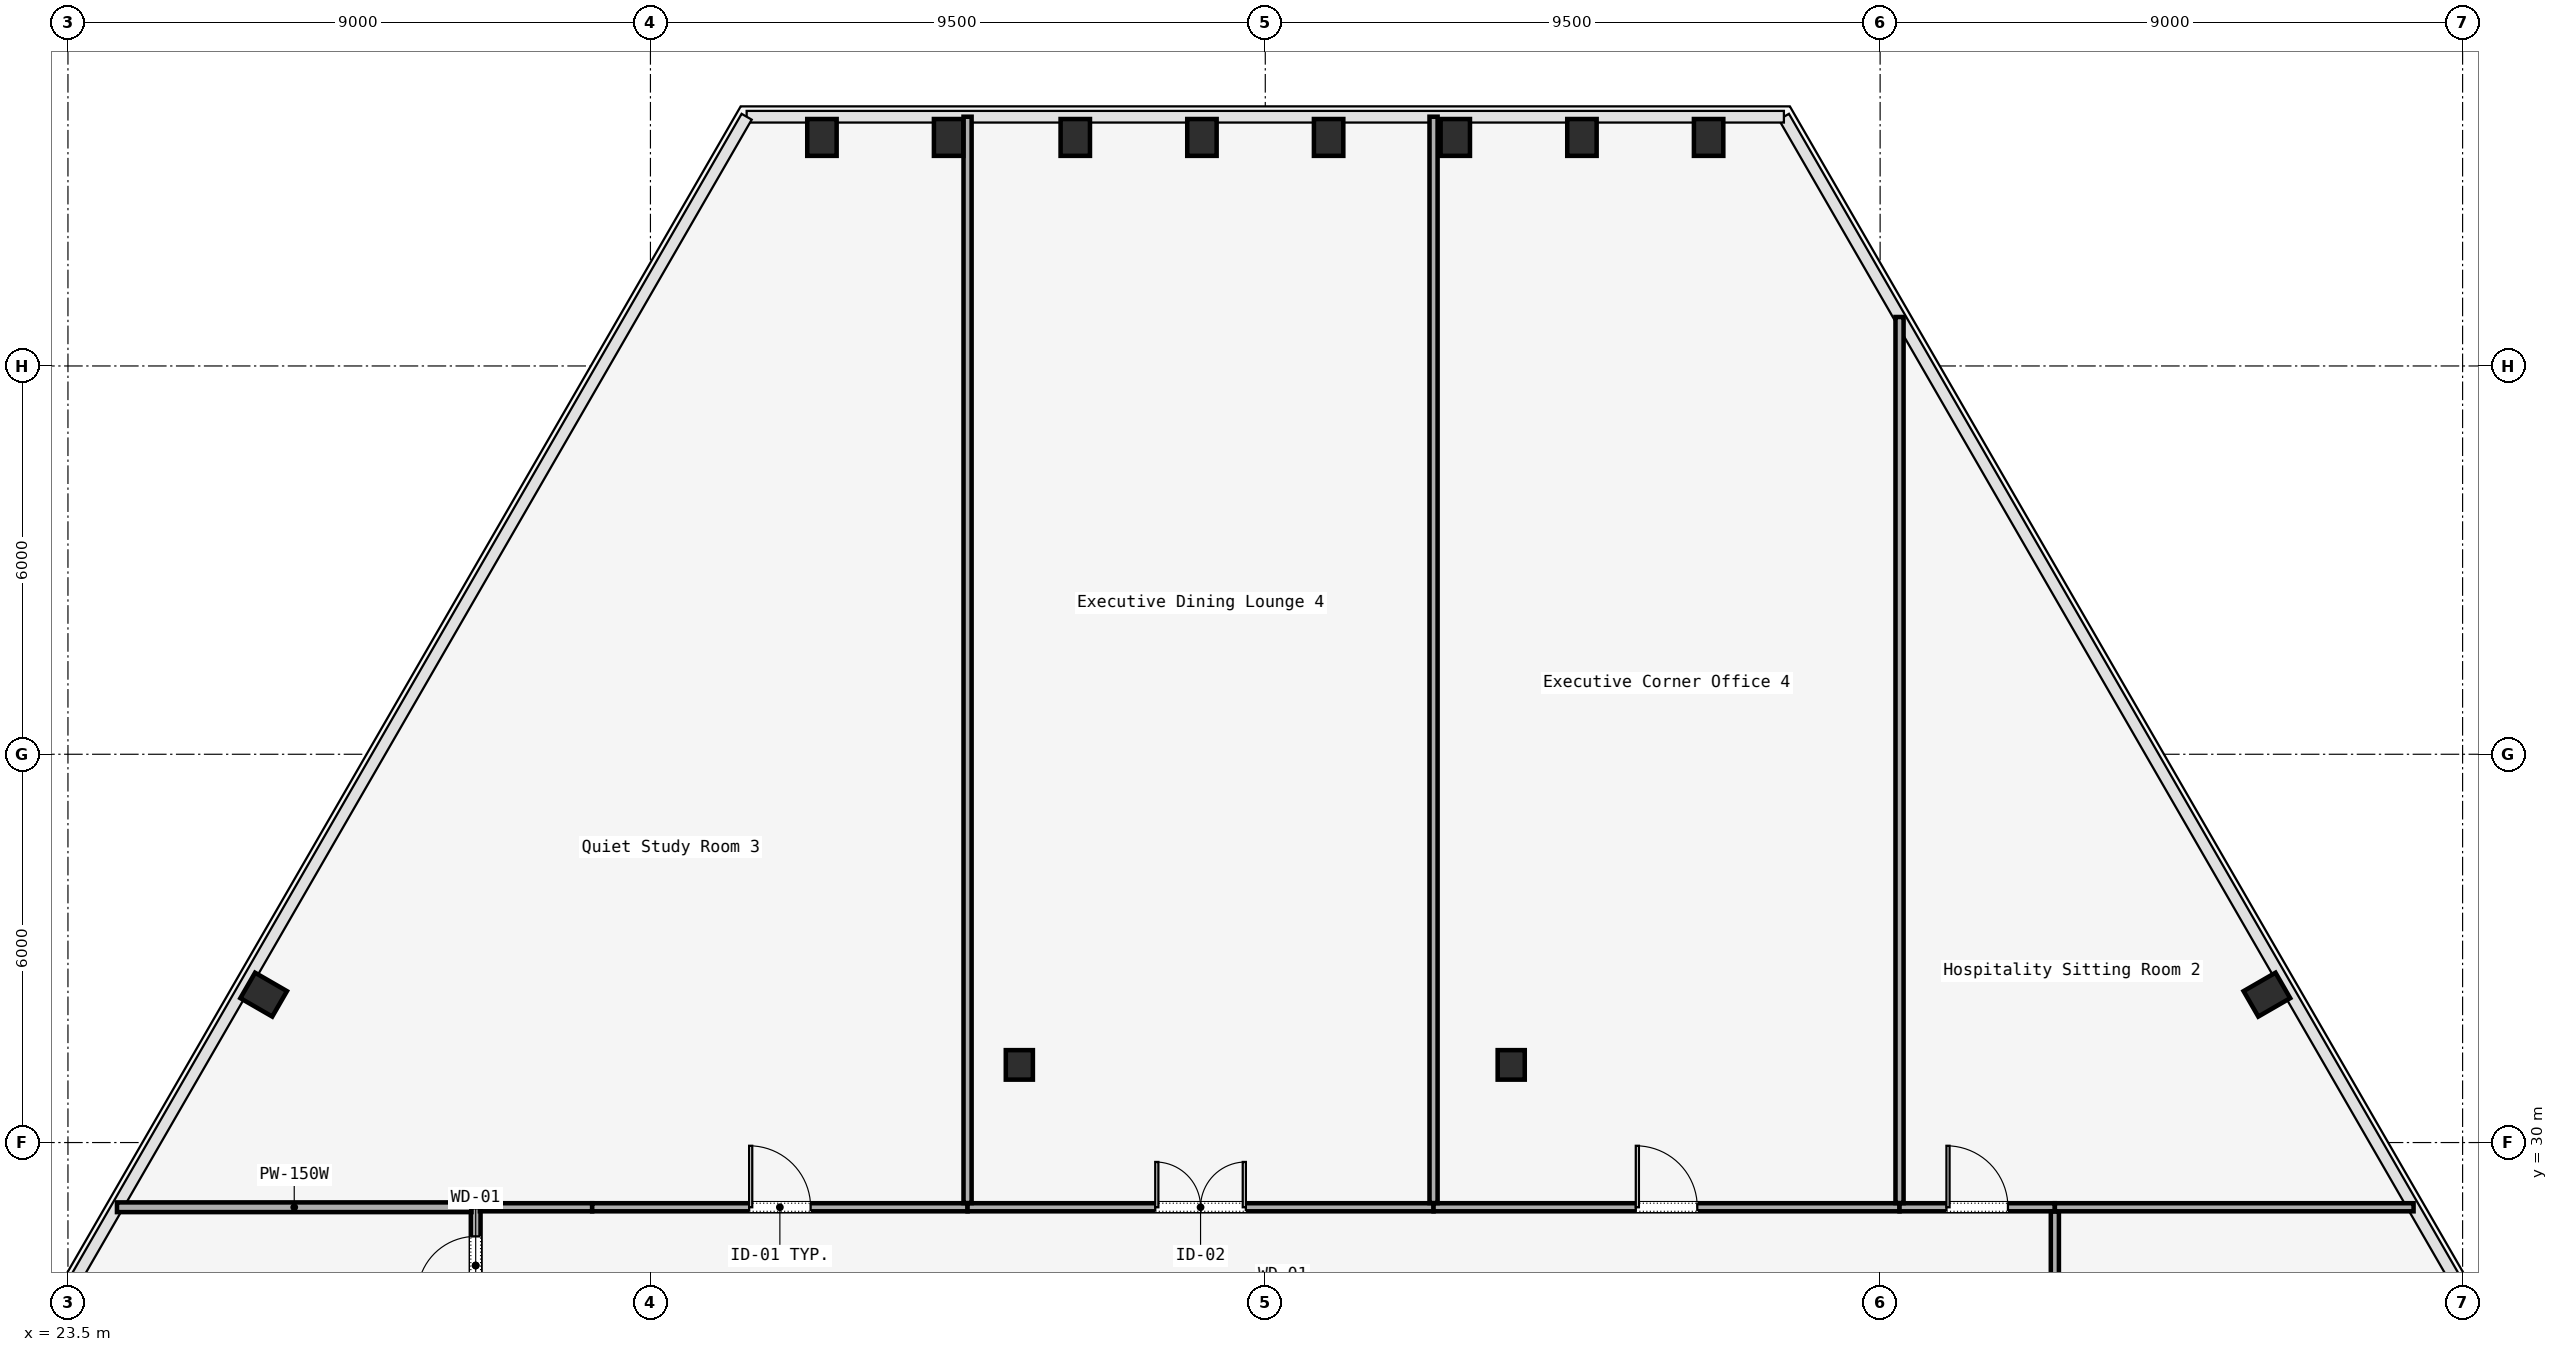
"""IFC4 building model, lengths in metres.
Left out: names, types, materials, properties, quantities, classifications, styles, units other than length and angle.
Written with IfcOpenShell. Run it as: python <this file> out.ifc"""

import sys

from ifc_helpers import new_model, si_unit, direction, frame, frame_2d, origin, origin_2d, place, context, subcontext, project, spatial, rectangle, i_section, extrude, element, fill, save


model = new_model("IFC4")
c1 = context("Model", 3, precision=1e-05, world=origin(), true_north=direction((0.0, 1.0)))
c2 = subcontext(c1, "Body", "Model", "MODEL_VIEW")
j1 = project(units=[si_unit("LENGTHUNIT", "METRE"), si_unit("PLANEANGLEUNIT", "RADIAN")], contexts=[c1])
p1 = place(None, origin())
s1 = spatial("IfcSite", under=j1, at=p1, CompositionType="ELEMENT")
p2 = place(p1, origin())
s2 = spatial("IfcBuilding", under=s1, at=p2, CompositionType="ELEMENT")
p3 = place(p2, frame((0.0, 0.0, 47.4)))
s3 = spatial("IfcBuildingStorey", under=s2, at=p3, CompositionType="ELEMENT", Elevation=47.4)
for number, where, z_axis, x_axis in (
    (1, (38.2, 31.2, 0.0), (0.0, 0.0, 1.0), (1.0, 0.0, 0.0)),
    (2, (45.8, 31.2, 0.0), (0.0, 0.0, 1.0), (1.0, 0.0, 0.0)),
):
    element("IfcColumn", number, at=place(p3, frame(where, z_axis=z_axis, x_axis=x_axis)), inside=s3, PredefinedType="COLUMN", context=c2, shape_type="SweptSolid", body=[
        extrude(i_section(OverallWidth=0.418, OverallDepth=0.456, WebThickness=0.042, FlangeThickness=0.067, FilletRadius=0.015, at=origin_2d()), origin(), (0.0, 0.0, 1.0), 3.58),
    ])
for number, where, z_axis, x_axis in (
    (3, (57.476, 32.285, 0.0), (0.0, 0.0, 1.0), (-0.5, 0.866, 0.0)),
    (4, (48.85, 45.531, 0.0), (0.0, 0.0, 1.0), (1.0, 0.0, 0.0)),
    (5, (46.893, 45.531, 0.0), (0.0, 0.0, 1.0), (1.0, 0.0, 0.0)),
    (6, (44.936, 45.531, 0.0), (0.0, 0.0, 1.0), (1.0, 0.0, 0.0)),
    (7, (42.979, 45.531, 0.0), (0.0, 0.0, 1.0), (1.0, 0.0, 0.0)),
    (8, (41.021, 45.531, 0.0), (0.0, 0.0, 1.0), (1.0, 0.0, 0.0)),
    (9, (39.064, 45.531, 0.0), (0.0, 0.0, 1.0), (1.0, 0.0, 0.0)),
    (10, (37.107, 45.531, 0.0), (0.0, 0.0, 1.0), (1.0, 0.0, 0.0)),
    (11, (35.15, 45.531, 0.0), (0.0, 0.0, 1.0), (1.0, 0.0, 0.0)),
    (12, (26.524, 32.285, 0.0), (0.0, 0.0, 1.0), (0.5, 0.866, 0.0)),
):
    element("IfcColumn", number, at=place(p3, frame(where, z_axis=z_axis, x_axis=x_axis)), inside=s3, PredefinedType="COLUMN", context=c2, shape_type="SweptSolid", body=[
        extrude(i_section(OverallWidth=0.454, OverallDepth=0.569, WebThickness=0.078, FlangeThickness=0.08, FilletRadius=0.015, at=origin_2d()), origin(), (0.0, 0.0, 1.0), 3.58),
    ])
p4 = place(p3, frame((29.8, 27.2, 0.0), z_axis=(0.0, 0.0, 1.0), x_axis=(0.0, 1.0, 0.0)))
e13 = element("IfcWall", 13, at=p4, inside=s3, PredefinedType="PARTITIONING", context=c2, shape_type="SweptSolid", body=[
    extrude(rectangle(XDim=1.8, YDim=0.15, at=frame_2d((0.9, 0.0))), origin(), (0.0, 0.0, 1.0), 2.933),
])
p5 = place(p4, frame((0.45, 0.0, 0.0)))
e14 = element("IfcOpeningElement", 14, at=p5, cuts=e13, PredefinedType="OPENING", context=c2, shape_type="SweptSolid", body=[
    extrude(rectangle(XDim=0.9, YDim=2.15, at=frame_2d((0.45, 1.075))), frame((0.0, 0.075, 0.0), z_axis=(0.0, -1.0, 0.0), x_axis=(1.0, 0.0, 0.0)), (0.0, 0.0, 1.0), 0.15),
])
p6 = place(p3, frame((29.865, 29.0, 0.0), z_axis=(0.0, 0.0, 1.0), x_axis=(1.0, 0.0, 0.0)))
e15 = element("IfcWall", 15, at=p6, inside=s3, PredefinedType="PARTITIONING", context=c2, shape_type="SweptSolid", body=[
    extrude(rectangle(XDim=1.735, YDim=0.125, at=frame_2d((0.868, 0.0))), origin(), (0.0, 0.0, 1.0), 2.933),
])
p7 = place(p3, frame((31.6, 29.0, 0.0), z_axis=(0.0, 0.0, 1.0), x_axis=(1.0, 0.0, 0.0)))
e16 = element("IfcWall", 16, at=p7, inside=s3, PredefinedType="PARTITIONING", context=c2, shape_type="SweptSolid", body=[
    extrude(rectangle(XDim=5.8, YDim=0.125, at=frame_2d((2.9, 0.0))), origin(), (0.0, 0.0, 1.0), 2.933),
])
p8 = place(p7, frame((2.425, 0.0, 0.0)))
e17 = element("IfcOpeningElement", 17, at=p8, cuts=e16, PredefinedType="OPENING", context=c2, shape_type="SweptSolid", body=[
    extrude(rectangle(XDim=0.95, YDim=2.2, at=frame_2d((0.475, 1.1))), frame((0.0, 0.062, 0.0), z_axis=(0.0, -1.0, 0.0), x_axis=(1.0, 0.0, 0.0)), (0.0, 0.0, 1.0), 0.125),
])
p9 = place(p3, frame((37.4, 29.0, 0.0), z_axis=(0.0, 0.0, 1.0), x_axis=(1.0, 0.0, 0.0)))
e18 = element("IfcWall", 18, at=p9, inside=s3, PredefinedType="PARTITIONING", context=c2, shape_type="SweptSolid", body=[
    extrude(rectangle(XDim=7.2, YDim=0.125, at=frame_2d((3.6, 0.0))), origin(), (0.0, 0.0, 1.0), 2.933),
])
p10 = place(p9, frame((2.9, 0.0, 0.0)))
e19 = element("IfcOpeningElement", 19, at=p10, cuts=e18, PredefinedType="OPENING", context=c2, shape_type="SweptSolid", body=[
    extrude(rectangle(XDim=1.4, YDim=2.2, at=frame_2d((0.7, 1.1))), frame((0.0, 0.062, 0.0), z_axis=(0.0, -1.0, 0.0), x_axis=(1.0, 0.0, 0.0)), (0.0, 0.0, 1.0), 0.125),
])
p11 = place(p3, frame((44.6, 29.0, 0.0), z_axis=(0.0, 0.0, 1.0), x_axis=(1.0, 0.0, 0.0)))
e20 = element("IfcWall", 20, at=p11, inside=s3, PredefinedType="PARTITIONING", context=c2, shape_type="SweptSolid", body=[
    extrude(rectangle(XDim=7.2, YDim=0.125, at=frame_2d((3.6, 0.0))), origin(), (0.0, 0.0, 1.0), 2.933),
])
p12 = place(p11, frame((3.125, 0.0, 0.0)))
e21 = element("IfcOpeningElement", 21, at=p12, cuts=e20, PredefinedType="OPENING", context=c2, shape_type="SweptSolid", body=[
    extrude(rectangle(XDim=0.95, YDim=2.2, at=frame_2d((0.475, 1.1))), frame((0.0, 0.062, 0.0), z_axis=(0.0, -1.0, 0.0), x_axis=(1.0, 0.0, 0.0)), (0.0, 0.0, 1.0), 0.125),
])
p13 = place(p3, frame((51.8, 29.0, 0.0), z_axis=(0.0, 0.0, 1.0), x_axis=(1.0, 0.0, 0.0)))
e22 = element("IfcWall", 22, at=p13, inside=s3, PredefinedType="PARTITIONING", context=c2, shape_type="SweptSolid", body=[
    extrude(rectangle(XDim=2.4, YDim=0.125, at=frame_2d((1.2, 0.0))), origin(), (0.0, 0.0, 1.0), 2.933),
])
p14 = place(p13, frame((0.725, 0.0, 0.0)))
e23 = element("IfcOpeningElement", 23, at=p14, cuts=e22, PredefinedType="OPENING", context=c2, shape_type="SweptSolid", body=[
    extrude(rectangle(XDim=0.95, YDim=2.2, at=frame_2d((0.475, 1.1))), frame((0.0, 0.062, 0.0), z_axis=(0.0, -1.0, 0.0), x_axis=(1.0, 0.0, 0.0)), (0.0, 0.0, 1.0), 0.125),
])
p15 = place(p3, frame((54.2, 28.935, 0.0), z_axis=(0.0, 0.0, 1.0), x_axis=(0.0, -1.0, 0.0)))
e24 = element("IfcWall", 24, at=p15, inside=s3, PredefinedType="PARTITIONING", context=c2, shape_type="SweptSolid", body=[
    extrude(rectangle(XDim=1.735, YDim=0.125, at=frame_2d((0.868, 0.0))), origin(), (0.0, 0.0, 1.0), 2.933),
])
p16 = place(p3, frame((54.2, 29.0, 0.0), z_axis=(0.0, 0.0, 1.0), x_axis=(1.0, 0.0, 0.0)))
e25 = element("IfcWall", 25, at=p16, inside=s3, PredefinedType="PARTITIONING", context=c2, shape_type="SweptSolid", body=[
    extrude(rectangle(XDim=5.542, YDim=0.125, at=frame_2d((2.771, 0.0))), origin(), (0.0, 0.0, 1.0), 2.933),
])
p17 = place(p3, frame((24.258, 29.0, 0.0), z_axis=(0.0, 0.0, 1.0), x_axis=(1.0, 0.0, 0.0)))
e26 = element("IfcWall", 26, at=p17, inside=s3, PredefinedType="PARTITIONING", context=c2, shape_type="SweptSolid", body=[
    extrude(rectangle(XDim=5.478, YDim=0.15, at=frame_2d((2.739, 0.0))), origin(), (0.0, 0.0, 1.0), 2.933),
])
p18 = place(p3, frame((51.8, 29.065, 0.0), z_axis=(0.0, 0.0, 1.0), x_axis=(0.0, 1.0, 0.0)))
e27 = element("IfcWall", 27, at=p18, inside=s3, PredefinedType="PARTITIONING", context=c2, shape_type="SweptSolid", body=[
    extrude(rectangle(XDim=13.692, YDim=0.125, at=frame_2d((6.846, 0.0))), origin(), (0.0, 0.0, 1.0), 2.933),
])
for number, where, z_axis, x_axis in (
    (28, (37.4, 45.851, 0.0), (0.0, 0.0, 1.0), (0.0, -1.0, 0.0)),
    (29, (44.6, 29.065, 0.0), (0.0, 0.0, 1.0), (0.0, 1.0, 0.0)),
):
    element("IfcWall", number, at=place(p3, frame(where, z_axis=z_axis, x_axis=x_axis)), inside=s3, PredefinedType="PARTITIONING", context=c2, shape_type="SweptSolid", body=[
        extrude(rectangle(XDim=16.786, YDim=0.125, at=frame_2d((8.393, 0.0))), origin(), (0.0, 0.0, 1.0), 2.933),
    ])
p19 = place(p5, origin())
e30 = element("IfcDoor", 30, at=p19, inside=s3, OperationType="SINGLE_SWING_LEFT", PredefinedType="DOOR", context=c2, shape_type="SweptSolid", body=[
    extrude(rectangle(XDim=0.9, YDim=2.15, at=frame_2d((0.45, 1.075))), frame((0.0, 0.025, 0.0), z_axis=(0.0, -1.0, 0.0), x_axis=(1.0, 0.0, 0.0)), (0.0, 0.0, 1.0), 0.05),
])
fill(e14, e30)
p20 = place(p14, origin())
e31 = element("IfcDoor", 31, at=p20, inside=s3, OperationType="SINGLE_SWING_RIGHT", PredefinedType="DOOR", context=c2, shape_type="SweptSolid", body=[
    extrude(rectangle(XDim=0.95, YDim=2.2, at=frame_2d((0.475, 1.1))), frame((0.0, 0.025, 0.0), z_axis=(0.0, -1.0, 0.0), x_axis=(1.0, 0.0, 0.0)), (0.0, 0.0, 1.0), 0.05),
])
fill(e23, e31)
p21 = place(p8, origin())
e32 = element("IfcDoor", 32, at=p21, inside=s3, OperationType="SINGLE_SWING_LEFT", PredefinedType="DOOR", context=c2, shape_type="SweptSolid", body=[
    extrude(rectangle(XDim=0.95, YDim=2.2, at=frame_2d((0.475, 1.1))), frame((0.0, 0.025, 0.0), z_axis=(0.0, -1.0, 0.0), x_axis=(1.0, 0.0, 0.0)), (0.0, 0.0, 1.0), 0.05),
])
fill(e17, e32)
p22 = place(p12, origin())
e33 = element("IfcDoor", 33, at=p22, inside=s3, OperationType="SINGLE_SWING_RIGHT", PredefinedType="DOOR", context=c2, shape_type="SweptSolid", body=[
    extrude(rectangle(XDim=0.95, YDim=2.2, at=frame_2d((0.475, 1.1))), frame((0.0, 0.025, 0.0), z_axis=(0.0, -1.0, 0.0), x_axis=(1.0, 0.0, 0.0)), (0.0, 0.0, 1.0), 0.05),
])
fill(e21, e33)
p23 = place(p10, origin())
e34 = element("IfcDoor", 34, at=p23, inside=s3, OperationType="SINGLE_SWING_LEFT", PredefinedType="DOOR", context=c2, shape_type="SweptSolid", body=[
    extrude(rectangle(XDim=1.4, YDim=2.2, at=frame_2d((0.7, 1.1))), frame((0.0, 0.025, 0.0), z_axis=(0.0, -1.0, 0.0), x_axis=(1.0, 0.0, 0.0)), (0.0, 0.0, 1.0), 0.05),
])
fill(e19, e34)
save(model, sys.argv[1])
